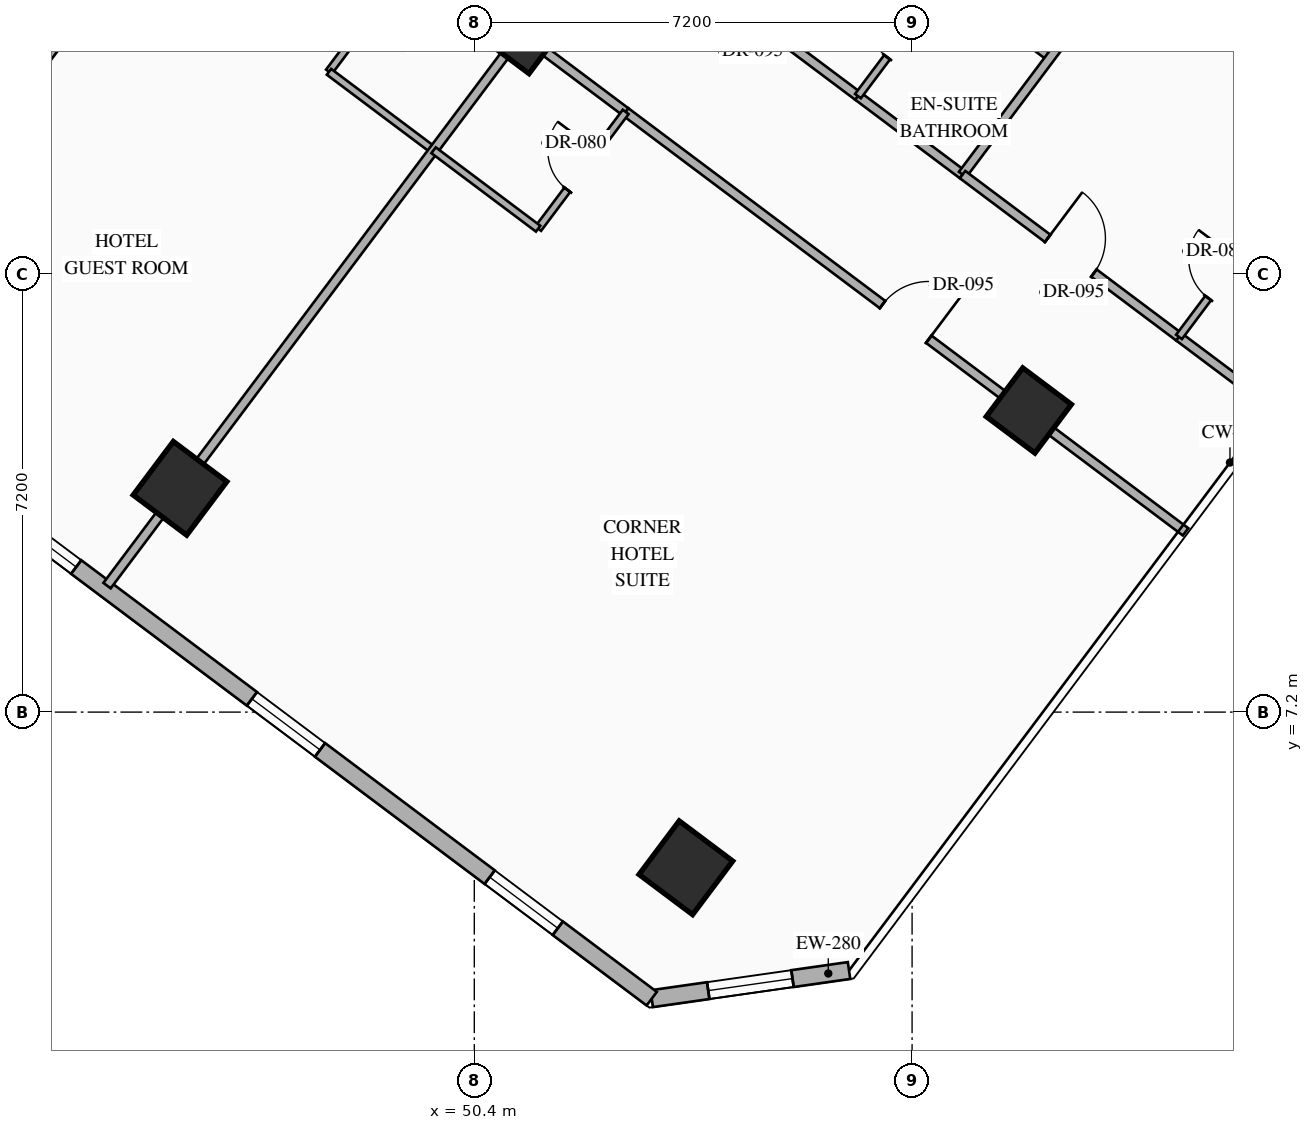
"""IFC4 building model, lengths in metres.
Left out: names, types, materials, properties, quantities, classifications, styles, units other than length and angle.
Written with IfcOpenShell. Run it as: python <this file> out.ifc"""

import sys

from ifc_helpers import new_model, si_unit, direction, frame, frame_2d, origin, origin_2d, place, context, subcontext, project, spatial, rectangle, hollow_rectangle, extrude, element, fill, save


model = new_model("IFC4")
c1 = context("Model", 3, precision=1e-05, world=origin(), true_north=direction((0.0, 1.0)))
c2 = subcontext(c1, "Body", "Model", "MODEL_VIEW")
j1 = project(units=[si_unit("LENGTHUNIT", "METRE"), si_unit("PLANEANGLEUNIT", "RADIAN")], contexts=[c1])
p1 = place(None, origin())
s1 = spatial("IfcSite", under=j1, at=p1, CompositionType="ELEMENT")
p2 = place(p1, origin())
s2 = spatial("IfcBuilding", under=s1, at=p2, CompositionType="ELEMENT")
p3 = place(p2, frame((0.0, 0.0, 53.35)))
s3 = spatial("IfcBuildingStorey", under=s2, at=p3, CompositionType="ELEMENT", Elevation=53.35)
p4 = place(p3, frame((45.56, 10.88, 0.0), z_axis=(0.0, 0.0, 1.0), x_axis=(0.799999996291, -0.600000004945, 0.0)))
e1 = element("IfcColumn", 1, at=p4, inside=s3, PredefinedType="COLUMN", context=c2, shape_type="SweptSolid", body=[
    extrude(hollow_rectangle(XDim=1.1, YDim=1.1, WallThickness=0.04, at=origin_2d()), origin(), (0.0, 0.0, 1.0), 3.35),
])
p5 = place(p3, frame((51.2, 18.4, 0.0), z_axis=(0.0, 0.0, 1.0), x_axis=(0.799999996291, -0.600000004945, 0.0)))
e2 = element("IfcColumn", 2, at=p5, inside=s3, PredefinedType="COLUMN", context=c2, shape_type="SweptSolid", body=[
    extrude(hollow_rectangle(XDim=1.0, YDim=1.0, WallThickness=0.038, at=origin_2d()), origin(), (0.0, 0.0, 1.0), 3.35),
])
p6 = place(p3, frame((53.88, 4.64, 0.0), z_axis=(0.0, 0.0, 1.0), x_axis=(0.799999996291, -0.600000004945, 0.0)))
e3 = element("IfcColumn", 3, at=p6, inside=s3, PredefinedType="COLUMN", context=c2, shape_type="SweptSolid", body=[
    extrude(hollow_rectangle(XDim=1.1, YDim=1.1, WallThickness=0.04, at=origin_2d()), origin(), (0.0, 0.0, 1.0), 3.35),
])
p7 = place(p3, frame((59.52, 12.16, 0.0), z_axis=(0.0, 0.0, 1.0), x_axis=(0.799999996291, -0.600000004945, 0.0)))
e4 = element("IfcColumn", 4, at=p7, inside=s3, PredefinedType="COLUMN", context=c2, shape_type="SweptSolid", body=[
    extrude(hollow_rectangle(XDim=1.0, YDim=1.0, WallThickness=0.038, at=origin_2d()), origin(), (0.0, 0.0, 1.0), 3.35),
])
p8 = place(p3, frame((56.563, 2.95, 0.0), z_axis=(0.0, 0.0, 1.0), x_axis=(-0.989977778067, -0.141223223777, 0.0)))
e5 = element("IfcWall", 5, at=p8, inside=s3, PredefinedType="STANDARD", context=c2, shape_type="SweptSolid", body=[
    extrude(rectangle(XDim=3.278, YDim=0.28, at=frame_2d((1.639, 0.0))), origin(), (0.0, 0.0, 1.0), 3.13),
])
p9 = place(p8, frame((0.939, 0.0, 0.85)))
e6 = element("IfcOpeningElement", 6, at=p9, cuts=e5, PredefinedType="OPENING", context=c2, shape_type="SweptSolid", body=[
    extrude(rectangle(XDim=1.4, YDim=1.8, at=frame_2d((0.7, 0.9))), frame((0.0, 0.15, 0.0), z_axis=(0.0, -1.0, 0.0), x_axis=(1.0, 0.0, 0.0)), (0.0, 0.0, 1.0), 0.3),
])
p10 = place(p3, frame((53.318, 2.487, 0.0), z_axis=(0.0, 0.0, 1.0), x_axis=(-0.800004174678, 0.599994433723, 0.0)))
e7 = element("IfcWall", 7, at=p10, inside=s3, PredefinedType="STANDARD", context=c2, shape_type="SweptSolid", body=[
    extrude(rectangle(XDim=35.089, YDim=0.28, at=frame_2d((17.544, 0.0))), origin(), (0.0, 0.0, 1.0), 3.13),
])
p11 = place(p10, frame((1.931, 0.0, 0.85)))
e8 = element("IfcOpeningElement", 8, at=p11, cuts=e7, PredefinedType="OPENING", context=c2, shape_type="SweptSolid", body=[
    extrude(rectangle(XDim=1.4, YDim=1.8, at=frame_2d((0.7, 0.9))), frame((0.0, 0.15, 0.0), z_axis=(0.0, -1.0, 0.0), x_axis=(1.0, 0.0, 0.0)), (0.0, 0.0, 1.0), 0.3),
])
p12 = place(p10, frame((6.819, 0.0, 0.85)))
e9 = element("IfcOpeningElement", 9, at=p12, cuts=e7, PredefinedType="OPENING", context=c2, shape_type="SweptSolid", body=[
    extrude(rectangle(XDim=1.4, YDim=1.8, at=frame_2d((0.7, 0.9))), frame((0.0, 0.15, 0.0), z_axis=(0.0, -1.0, 0.0), x_axis=(1.0, 0.0, 0.0)), (0.0, 0.0, 1.0), 0.3),
])
p13 = place(p10, frame((11.832, 0.0, 0.85)))
e10 = element("IfcOpeningElement", 10, at=p13, cuts=e7, PredefinedType="OPENING", context=c2, shape_type="SweptSolid", body=[
    extrude(rectangle(XDim=1.4, YDim=1.8, at=frame_2d((0.7, 0.9))), frame((0.0, 0.15, 0.0), z_axis=(0.0, -1.0, 0.0), x_axis=(1.0, 0.0, 0.0)), (0.0, 0.0, 1.0), 0.3),
])
p14 = place(p10, frame((17.647, 0.0, 0.85)))
e11 = element("IfcOpeningElement", 11, at=p14, cuts=e7, PredefinedType="OPENING", context=c2, shape_type="SweptSolid", body=[
    extrude(rectangle(XDim=1.4, YDim=1.8, at=frame_2d((0.7, 0.9))), frame((0.0, 0.15, 0.0), z_axis=(0.0, -1.0, 0.0), x_axis=(1.0, 0.0, 0.0)), (0.0, 0.0, 1.0), 0.3),
])
p15 = place(p10, frame((21.857, 0.0, 0.85)))
e12 = element("IfcOpeningElement", 12, at=p15, cuts=e7, PredefinedType="OPENING", context=c2, shape_type="SweptSolid", body=[
    extrude(rectangle(XDim=1.4, YDim=1.8, at=frame_2d((0.7, 0.9))), frame((0.0, 0.15, 0.0), z_axis=(0.0, -1.0, 0.0), x_axis=(1.0, 0.0, 0.0)), (0.0, 0.0, 1.0), 0.3),
])
p16 = place(p10, frame((26.87, 0.0, 0.85)))
e13 = element("IfcOpeningElement", 13, at=p16, cuts=e7, PredefinedType="OPENING", context=c2, shape_type="SweptSolid", body=[
    extrude(rectangle(XDim=1.4, YDim=1.8, at=frame_2d((0.7, 0.9))), frame((0.0, 0.15, 0.0), z_axis=(0.0, -1.0, 0.0), x_axis=(1.0, 0.0, 0.0)), (0.0, 0.0, 1.0), 0.3),
])
p17 = place(p10, frame((31.757, 0.0, 0.85)))
e14 = element("IfcOpeningElement", 14, at=p17, cuts=e7, PredefinedType="OPENING", context=c2, shape_type="SweptSolid", body=[
    extrude(rectangle(XDim=1.4, YDim=1.8, at=frame_2d((0.7, 0.9))), frame((0.0, 0.15, 0.0), z_axis=(0.0, -1.0, 0.0), x_axis=(1.0, 0.0, 0.0)), (0.0, 0.0, 1.0), 0.3),
])
p18 = place(p3, frame((39.464, 12.752, 0.0), z_axis=(0.0, 0.0, 1.0), x_axis=(0.6, 0.8, 0.0)))
e15 = element("IfcWall", 15, at=p18, inside=s3, PredefinedType="PARTITIONING", context=c2, shape_type="SweptSolid", body=[
    extrude(rectangle(XDim=11.51, YDim=0.15, at=frame_2d((5.755, 0.0))), origin(), (0.0, 0.0, 1.0), 3.13),
])
p19 = place(p3, frame((53.15, 20.0, 0.0), z_axis=(0.0, 0.0, 1.0), x_axis=(0.800013166942, -0.599982443676, 0.0)))
e16 = element("IfcWall", 16, at=p19, inside=s3, PredefinedType="PARTITIONING", context=c2, shape_type="SweptSolid", body=[
    extrude(rectangle(XDim=4.45, YDim=0.15, at=frame_2d((2.225, 0.0))), origin(), (0.0, 0.0, 1.0), 2.775),
])
p20 = place(p19, frame((1.75, 0.0, 0.0)))
e17 = element("IfcOpeningElement", 17, at=p20, cuts=e16, PredefinedType="OPENING", context=c2, shape_type="SweptSolid", body=[
    extrude(rectangle(XDim=0.95, YDim=2.15, at=frame_2d((0.475, 1.075))), frame((0.0, 0.085, 0.0), z_axis=(0.0, -1.0, 0.0), x_axis=(1.0, 0.0, 0.0)), (0.0, 0.0, 1.0), 0.17),
])
p21 = place(p3, frame((56.71, 17.33, 0.0), z_axis=(0.0, 0.0, 1.0), x_axis=(0.79998637334, -0.60001816845, 0.0)))
e18 = element("IfcWall", 18, at=p21, inside=s3, PredefinedType="PARTITIONING", context=c2, shape_type="SweptSolid", body=[
    extrude(rectangle(XDim=2.15, YDim=0.15, at=frame_2d((1.075, 0.0))), origin(), (0.0, 0.0, 1.0), 2.775),
])
p22 = place(p3, frame((56.71, 17.33, 0.0), z_axis=(0.0, 0.0, 1.0), x_axis=(0.6, 0.8, 0.0)))
e19 = element("IfcWall", 19, at=p22, inside=s3, PredefinedType="PARTITIONING", context=c2, shape_type="SweptSolid", body=[
    extrude(rectangle(XDim=2.4, YDim=0.12, at=frame_2d((1.2, 0.0))), origin(), (0.0, 0.0, 1.0), 3.13),
])
p23 = place(p22, frame((0.8, 0.0, 0.0)))
e20 = element("IfcOpeningElement", 20, at=p23, cuts=e19, PredefinedType="OPENING", context=c2, shape_type="SweptSolid", body=[
    extrude(rectangle(XDim=0.8, YDim=2.06, at=frame_2d((0.4, 1.03))), frame((0.0, 0.07, 0.0), z_axis=(0.0, -1.0, 0.0), x_axis=(1.0, 0.0, 0.0)), (0.0, 0.0, 1.0), 0.14),
])
p24 = place(p3, frame((58.15, 19.25, 0.0), z_axis=(0.0, 0.0, 1.0), x_axis=(0.800027249606, -0.599963665473, 0.0)))
e21 = element("IfcWall", 21, at=p24, inside=s3, PredefinedType="PARTITIONING", context=c2, shape_type="SweptSolid", body=[
    extrude(rectangle(XDim=2.15, YDim=0.12, at=frame_2d((1.075, 0.0))), origin(), (0.0, 0.0, 1.0), 3.13),
])
p25 = place(p3, frame((58.43, 16.04, 0.0), z_axis=(0.0, 0.0, 1.0), x_axis=(0.60001014597, 0.799992390422, 0.0)))
e22 = element("IfcWall", 22, at=p25, inside=s3, PredefinedType="PARTITIONING", context=c2, shape_type="SweptSolid", body=[
    extrude(rectangle(XDim=11.55, YDim=0.15, at=frame_2d((5.775, 0.0))), origin(), (0.0, 0.0, 1.0), 3.13),
])
p26 = place(p3, frame((58.43, 16.04, 0.0), z_axis=(0.0, 0.0, 1.0), x_axis=(0.800013166942, -0.599982443676, 0.0)))
e23 = element("IfcWall", 23, at=p26, inside=s3, PredefinedType="PARTITIONING", context=c2, shape_type="SweptSolid", body=[
    extrude(rectangle(XDim=4.45, YDim=0.15, at=frame_2d((2.225, 0.0))), origin(), (0.0, 0.0, 1.0), 2.775),
])
p27 = place(p26, frame((1.75, 0.0, 0.0)))
e24 = element("IfcOpeningElement", 24, at=p27, cuts=e23, PredefinedType="OPENING", context=c2, shape_type="SweptSolid", body=[
    extrude(rectangle(XDim=0.95, YDim=2.15, at=frame_2d((0.475, 1.075))), frame((0.0, 0.085, 0.0), z_axis=(0.0, -1.0, 0.0), x_axis=(1.0, 0.0, 0.0)), (0.0, 0.0, 1.0), 0.17),
])
p28 = place(p3, frame((61.99, 13.37, 0.0), z_axis=(0.0, 0.0, 1.0), x_axis=(0.79997084737, -0.600038868206, 0.0)))
e25 = element("IfcWall", 25, at=p28, inside=s3, PredefinedType="PARTITIONING", context=c2, shape_type="SweptSolid", body=[
    extrude(rectangle(XDim=2.01, YDim=0.15, at=frame_2d((1.005, 0.0))), origin(), (0.0, 0.0, 1.0), 3.13),
])
p29 = place(p3, frame((61.99, 13.37, 0.0), z_axis=(0.0, 0.0, 1.0), x_axis=(0.6, 0.8, 0.0)))
e26 = element("IfcWall", 26, at=p29, inside=s3, PredefinedType="PARTITIONING", context=c2, shape_type="SweptSolid", body=[
    extrude(rectangle(XDim=2.4, YDim=0.12, at=frame_2d((1.2, 0.0))), origin(), (0.0, 0.0, 1.0), 3.13),
])
p30 = place(p29, frame((0.8, 0.0, 0.0)))
e27 = element("IfcOpeningElement", 27, at=p30, cuts=e26, PredefinedType="OPENING", context=c2, shape_type="SweptSolid", body=[
    extrude(rectangle(XDim=0.8, YDim=2.06, at=frame_2d((0.4, 1.03))), frame((0.0, 0.07, 0.0), z_axis=(0.0, -1.0, 0.0), x_axis=(1.0, 0.0, 0.0)), (0.0, 0.0, 1.0), 0.14),
])
p31 = place(p3, frame((48.01, 17.73, 0.0), z_axis=(0.0, 0.0, 1.0), x_axis=(0.6, 0.8, 0.0)))
e28 = element("IfcWall", 28, at=p31, inside=s3, PredefinedType="PARTITIONING", context=c2, shape_type="SweptSolid", body=[
    extrude(rectangle(XDim=2.4, YDim=0.12, at=frame_2d((1.2, 0.0))), origin(), (0.0, 0.0, 1.0), 3.13),
])
p32 = place(p31, frame((0.8, 0.0, 0.0)))
e29 = element("IfcOpeningElement", 29, at=p32, cuts=e28, PredefinedType="OPENING", context=c2, shape_type="SweptSolid", body=[
    extrude(rectangle(XDim=0.8, YDim=2.06, at=frame_2d((0.4, 1.03))), frame((0.0, 0.07, 0.0), z_axis=(0.0, -1.0, 0.0), x_axis=(1.0, 0.0, 0.0)), (0.0, 0.0, 1.0), 0.14),
])
p33 = place(p3, frame((48.01, 17.73, 0.0), z_axis=(0.0, 0.0, 1.0), x_axis=(0.79998637334, -0.60001816845, 0.0)))
e30 = element("IfcWall", 30, at=p33, inside=s3, PredefinedType="PARTITIONING", context=c2, shape_type="SweptSolid", body=[
    extrude(rectangle(XDim=2.15, YDim=0.12, at=frame_2d((1.075, 0.0))), origin(), (0.0, 0.0, 1.0), 3.13),
])
p34 = place(p3, frame((44.36, 9.28, 0.0), z_axis=(0.0, 0.0, 1.0), x_axis=(0.599986233332, 0.800010324816, 0.0)))
e31 = element("IfcWall", 31, at=p34, inside=s3, PredefinedType="PARTITIONING", context=c2, shape_type="SweptSolid", body=[
    extrude(rectangle(XDim=11.35, YDim=0.15, at=frame_2d((5.675, 0.0))), origin(), (0.0, 0.0, 1.0), 2.425),
])
p35 = place(p3, frame((51.17, 18.36, 0.0), z_axis=(0.0, 0.0, 1.0), x_axis=(0.79998637334, -0.60001816845, 0.0)))
e32 = element("IfcWall", 32, at=p35, inside=s3, PredefinedType="PARTITIONING", context=c2, shape_type="SweptSolid", body=[
    extrude(rectangle(XDim=2.15, YDim=0.15, at=frame_2d((1.075, 0.0))), origin(), (0.0, 0.0, 1.0), 2.425),
])
p36 = place(p3, frame((52.89, 17.07, 0.0), z_axis=(0.0, 0.0, 1.0), x_axis=(0.8, -0.6, 0.0)))
e33 = element("IfcWall", 33, at=p36, inside=s3, PredefinedType="PARTITIONING", context=c2, shape_type="SweptSolid", body=[
    extrude(rectangle(XDim=11.51, YDim=0.15, at=frame_2d((5.755, 0.0))), origin(), (0.0, 0.0, 1.0), 2.425),
])
p37 = place(p36, frame((5.28, 0.0, 0.0)))
e34 = element("IfcOpeningElement", 34, at=p37, cuts=e33, PredefinedType="OPENING", context=c2, shape_type="SweptSolid", body=[
    extrude(rectangle(XDim=0.95, YDim=2.15, at=frame_2d((0.475, 1.075))), frame((0.0, 0.085, 0.0), z_axis=(0.0, -1.0, 0.0), x_axis=(1.0, 0.0, 0.0)), (0.0, 0.0, 1.0), 0.17),
])
p38 = place(p3, frame((51.45, 15.15, 0.0), z_axis=(0.0, 0.0, 1.0), x_axis=(0.599951172744, 0.800036618114, 0.0)))
e35 = element("IfcWall", 35, at=p38, inside=s3, PredefinedType="PARTITIONING", context=c2, shape_type="SweptSolid", body=[
    extrude(rectangle(XDim=2.4, YDim=0.12, at=frame_2d((1.2, 0.0))), origin(), (0.0, 0.0, 1.0), 3.13),
])
p39 = place(p38, frame((0.8, 0.0, 0.0)))
e36 = element("IfcOpeningElement", 36, at=p39, cuts=e35, PredefinedType="OPENING", context=c2, shape_type="SweptSolid", body=[
    extrude(rectangle(XDim=0.8, YDim=2.06, at=frame_2d((0.4, 1.03))), frame((0.0, 0.07, 0.0), z_axis=(0.0, -1.0, 0.0), x_axis=(1.0, 0.0, 0.0)), (0.0, 0.0, 1.0), 0.14),
])
p40 = place(p3, frame((49.73, 16.44, 0.0), z_axis=(0.0, 0.0, 1.0), x_axis=(0.79998637334, -0.60001816845, 0.0)))
e37 = element("IfcWall", 37, at=p40, inside=s3, PredefinedType="PARTITIONING", context=c2, shape_type="SweptSolid", body=[
    extrude(rectangle(XDim=2.15, YDim=0.12, at=frame_2d((1.075, 0.0))), origin(), (0.0, 0.0, 1.0), 3.13),
])
p41 = place(p9, origin())
e38 = element("IfcWindow", 38, at=p41, inside=s3, PartitioningType="SINGLE_PANEL", PredefinedType="WINDOW", context=c2, shape_type="SweptSolid", body=[
    extrude(rectangle(XDim=1.4, YDim=1.8, at=frame_2d((0.7, 0.9))), frame((0.0, 0.03, 0.0), z_axis=(0.0, -1.0, 0.0), x_axis=(1.0, 0.0, 0.0)), (0.0, 0.0, 1.0), 0.06),
])
fill(e6, e38)
p42 = place(p11, origin())
e39 = element("IfcWindow", 39, at=p42, inside=s3, PartitioningType="SINGLE_PANEL", PredefinedType="WINDOW", context=c2, shape_type="SweptSolid", body=[
    extrude(rectangle(XDim=1.4, YDim=1.8, at=frame_2d((0.7, 0.9))), frame((0.0, 0.03, 0.0), z_axis=(0.0, -1.0, 0.0), x_axis=(1.0, 0.0, 0.0)), (0.0, 0.0, 1.0), 0.06),
])
fill(e8, e39)
p43 = place(p12, origin())
e40 = element("IfcWindow", 40, at=p43, inside=s3, PartitioningType="SINGLE_PANEL", PredefinedType="WINDOW", context=c2, shape_type="SweptSolid", body=[
    extrude(rectangle(XDim=1.4, YDim=1.8, at=frame_2d((0.7, 0.9))), frame((0.0, 0.03, 0.0), z_axis=(0.0, -1.0, 0.0), x_axis=(1.0, 0.0, 0.0)), (0.0, 0.0, 1.0), 0.06),
])
fill(e9, e40)
p44 = place(p13, origin())
e41 = element("IfcWindow", 41, at=p44, inside=s3, PartitioningType="SINGLE_PANEL", PredefinedType="WINDOW", context=c2, shape_type="SweptSolid", body=[
    extrude(rectangle(XDim=1.4, YDim=1.8, at=frame_2d((0.7, 0.9))), frame((0.0, 0.03, 0.0), z_axis=(0.0, -1.0, 0.0), x_axis=(1.0, 0.0, 0.0)), (0.0, 0.0, 1.0), 0.06),
])
fill(e10, e41)
p45 = place(p23, origin())
e42 = element("IfcDoor", 42, at=p45, inside=s3, OperationType="SINGLE_SWING_RIGHT", PredefinedType="DOOR", context=c2, shape_type="SweptSolid", body=[
    extrude(rectangle(XDim=0.8, YDim=2.06, at=frame_2d((0.4, 1.03))), frame((0.0, 0.025, 0.0), z_axis=(0.0, -1.0, 0.0), x_axis=(1.0, 0.0, 0.0)), (0.0, 0.0, 1.0), 0.05),
])
fill(e20, e42)
p46 = place(p27, origin())
e43 = element("IfcDoor", 43, at=p46, inside=s3, OperationType="SINGLE_SWING_LEFT", PredefinedType="DOOR", context=c2, shape_type="SweptSolid", body=[
    extrude(rectangle(XDim=0.95, YDim=2.15, at=frame_2d((0.475, 1.075))), frame((0.0, 0.025, 0.0), z_axis=(0.0, -1.0, 0.0), x_axis=(1.0, 0.0, 0.0)), (0.0, 0.0, 1.0), 0.05),
])
fill(e24, e43)
p47 = place(p30, origin())
e44 = element("IfcDoor", 44, at=p47, inside=s3, OperationType="SINGLE_SWING_RIGHT", PredefinedType="DOOR", context=c2, shape_type="SweptSolid", body=[
    extrude(rectangle(XDim=0.8, YDim=2.06, at=frame_2d((0.4, 1.03))), frame((0.0, 0.025, 0.0), z_axis=(0.0, -1.0, 0.0), x_axis=(1.0, 0.0, 0.0)), (0.0, 0.0, 1.0), 0.05),
])
fill(e27, e44)
p48 = place(p37, origin())
e45 = element("IfcDoor", 45, at=p48, inside=s3, OperationType="SINGLE_SWING_RIGHT", PredefinedType="DOOR", context=c2, shape_type="SweptSolid", body=[
    extrude(rectangle(XDim=0.95, YDim=2.15, at=frame_2d((0.475, 1.075))), frame((0.0, 0.025, 0.0), z_axis=(0.0, -1.0, 0.0), x_axis=(1.0, 0.0, 0.0)), (0.0, 0.0, 1.0), 0.05),
])
fill(e34, e45)
p49 = place(p39, origin())
e46 = element("IfcDoor", 46, at=p49, inside=s3, OperationType="SINGLE_SWING_RIGHT", PredefinedType="DOOR", context=c2, shape_type="SweptSolid", body=[
    extrude(rectangle(XDim=0.8, YDim=2.06, at=frame_2d((0.4, 1.03))), frame((0.0, 0.025, 0.0), z_axis=(0.0, -1.0, 0.0), x_axis=(1.0, 0.0, 0.0)), (0.0, 0.0, 1.0), 0.05),
])
fill(e36, e46)
save(model, sys.argv[1])
